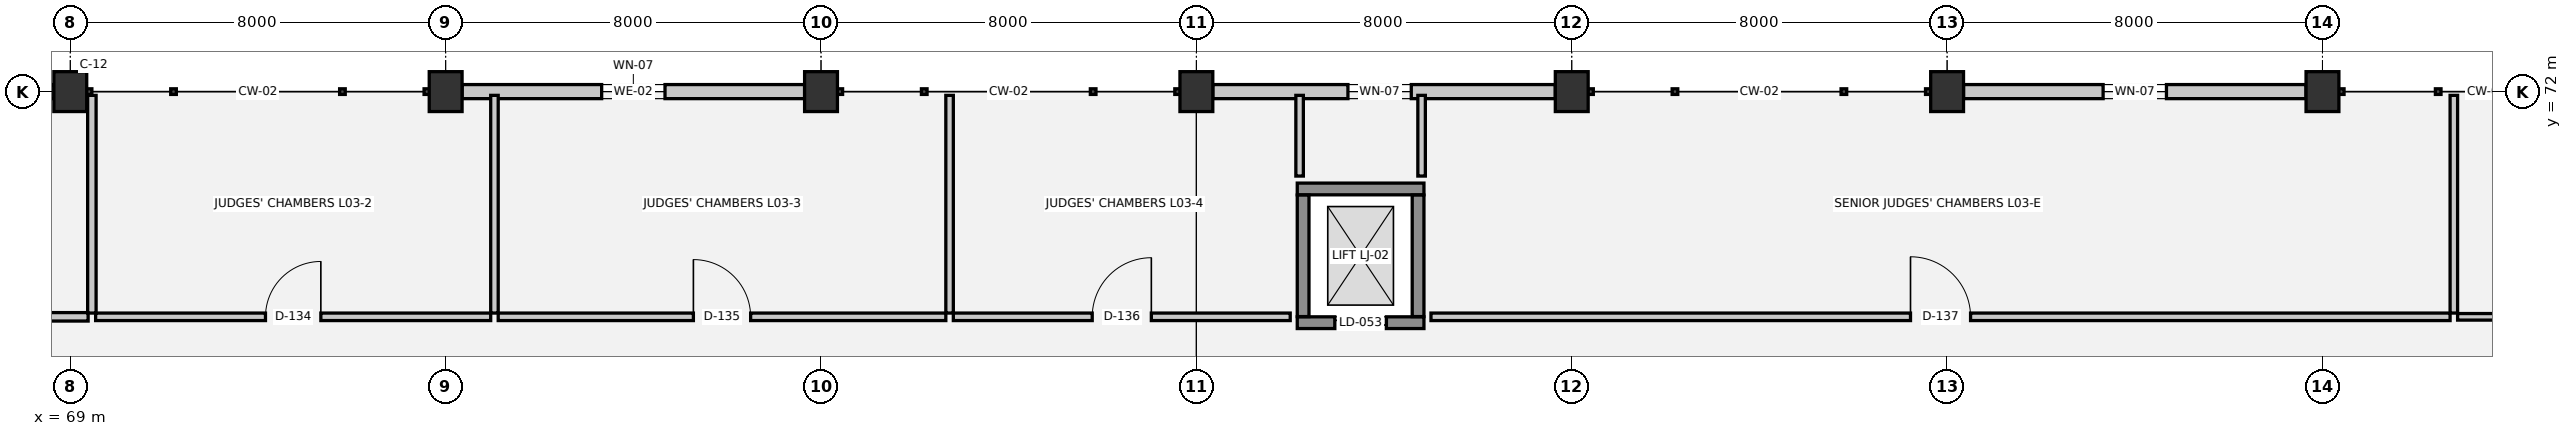
"""IFC4 building model, lengths in metres.
Left out: names, types, materials, properties, quantities, classifications, styles, units other than length and angle.
Written with IfcOpenShell. Run it as: python <this file> out.ifc"""

import sys

from ifc_helpers import new_model, si_unit, direction, frame, frame_2d, origin, origin_2d, place, context, subcontext, project, spatial, rectangle, extrude, element, fill, save


model = new_model("IFC4")
c1 = context("Model", 3, precision=1e-05, world=origin(), true_north=direction((0.0, 1.0)))
c2 = subcontext(c1, "Body", "Model", "MODEL_VIEW")
j1 = project(units=[si_unit("LENGTHUNIT", "METRE"), si_unit("PLANEANGLEUNIT", "RADIAN")], contexts=[c1])
p1 = place(None, origin())
s1 = spatial("IfcSite", under=j1, at=p1, CompositionType="ELEMENT")
p2 = place(p1, origin())
s2 = spatial("IfcBuilding", under=s1, at=p2, CompositionType="ELEMENT")
p3 = place(p2, frame((0.0, 0.0, 9.9)))
s3 = spatial("IfcBuildingStorey", under=s2, at=p3, CompositionType="ELEMENT", Elevation=9.9)
for number, where, z_axis, x_axis in (
    (1, (69.0, 72.0, 0.0), (0.0, 0.0, 1.0), (1.0, 0.0, 0.0)),
    (2, (77.0, 72.0, 0.0), (0.0, 0.0, 1.0), (1.0, 0.0, 0.0)),
    (3, (85.0, 72.0, 0.0), (0.0, 0.0, 1.0), (1.0, 0.0, 0.0)),
    (4, (93.0, 72.0, 0.0), (0.0, 0.0, 1.0), (1.0, 0.0, 0.0)),
    (5, (101.0, 72.0, 0.0), (0.0, 0.0, 1.0), (1.0, 0.0, 0.0)),
    (6, (109.0, 72.0, 0.0), (0.0, 0.0, 1.0), (1.0, 0.0, 0.0)),
    (7, (117.0, 72.0, 0.0), (0.0, 0.0, 1.0), (1.0, 0.0, 0.0)),
):
    element("IfcColumn", number, at=place(p3, frame(where, z_axis=z_axis, x_axis=x_axis)), inside=s3, PredefinedType="COLUMN", context=c2, shape_type="SweptSolid", body=[
        extrude(rectangle(XDim=0.7, YDim=0.85, at=origin_2d()), origin(), (0.0, 0.0, 1.0), 4.5),
    ])
p4 = place(p3, frame((62.35, 72.0, 0.0), z_axis=(0.0, 0.0, 1.0), x_axis=(1.0, 0.0, 0.0)))
e8 = element("IfcWall", 8, at=p4, inside=s3, PredefinedType="SOLIDWALL", context=c2, shape_type="SweptSolid", body=[
    extrude(rectangle(XDim=6.3, YDim=0.3, at=frame_2d((3.15, 0.0))), origin(), (0.0, 0.0, 1.0), 3.23),
])
p5 = place(p4, frame((2.475, 0.0, 1.0)))
e9 = element("IfcOpeningElement", 9, at=p5, cuts=e8, PredefinedType="OPENING", context=c2, shape_type="SweptSolid", body=[
    extrude(rectangle(XDim=1.35, YDim=1.65, at=frame_2d((0.675, 0.825))), frame((0.0, 0.16, 0.0), z_axis=(0.0, -1.0, 0.0), x_axis=(1.0, 0.0, 0.0)), (0.0, 0.0, 1.0), 0.32),
])
p6 = place(p3, frame((77.35, 72.0, 0.0), z_axis=(0.0, 0.0, 1.0), x_axis=(1.0, 0.0, 0.0)))
e10 = element("IfcWall", 10, at=p6, inside=s3, PredefinedType="SOLIDWALL", context=c2, shape_type="SweptSolid", body=[
    extrude(rectangle(XDim=7.3, YDim=0.3, at=frame_2d((3.65, 0.0))), origin(), (0.0, 0.0, 1.0), 3.23),
])
p7 = place(p6, frame((2.975, 0.0, 1.0)))
e11 = element("IfcOpeningElement", 11, at=p7, cuts=e10, PredefinedType="OPENING", context=c2, shape_type="SweptSolid", body=[
    extrude(rectangle(XDim=1.35, YDim=1.65, at=frame_2d((0.675, 0.825))), frame((0.0, 0.16, 0.0), z_axis=(0.0, -1.0, 0.0), x_axis=(1.0, 0.0, 0.0)), (0.0, 0.0, 1.0), 0.32),
])
p8 = place(p3, frame((93.35, 72.0, 0.0), z_axis=(0.0, 0.0, 1.0), x_axis=(1.0, 0.0, 0.0)))
e12 = element("IfcWall", 12, at=p8, inside=s3, PredefinedType="SOLIDWALL", context=c2, shape_type="SweptSolid", body=[
    extrude(rectangle(XDim=7.3, YDim=0.3, at=frame_2d((3.65, 0.0))), origin(), (0.0, 0.0, 1.0), 3.23),
])
p9 = place(p8, frame((2.88, 0.0, 1.0)))
e13 = element("IfcOpeningElement", 13, at=p9, cuts=e12, PredefinedType="OPENING", context=c2, shape_type="SweptSolid", body=[
    extrude(rectangle(XDim=1.35, YDim=1.65, at=frame_2d((0.675, 0.825))), frame((0.0, 0.16, 0.0), z_axis=(0.0, -1.0, 0.0), x_axis=(1.0, 0.0, 0.0)), (0.0, 0.0, 1.0), 0.32),
])
p10 = place(p3, frame((109.35, 72.0, 0.0), z_axis=(0.0, 0.0, 1.0), x_axis=(1.0, 0.0, 0.0)))
e14 = element("IfcWall", 14, at=p10, inside=s3, PredefinedType="SOLIDWALL", context=c2, shape_type="SweptSolid", body=[
    extrude(rectangle(XDim=7.3, YDim=0.3, at=frame_2d((3.65, 0.0))), origin(), (0.0, 0.0, 1.0), 3.23),
])
p11 = place(p10, frame((2.975, 0.0, 1.0)))
e15 = element("IfcOpeningElement", 15, at=p11, cuts=e14, PredefinedType="OPENING", context=c2, shape_type="SweptSolid", body=[
    extrude(rectangle(XDim=1.35, YDim=1.65, at=frame_2d((0.675, 0.825))), frame((0.0, 0.16, 0.0), z_axis=(0.0, -1.0, 0.0), x_axis=(1.0, 0.0, 0.0)), (0.0, 0.0, 1.0), 0.32),
])
p12 = place(p3, frame((95.15, 67.075, 0.0), z_axis=(0.0, 0.0, 1.0), x_axis=(1.0, 0.0, 0.0)))
e16 = element("IfcWall", 16, at=p12, inside=s3, PredefinedType="SHEAR", context=c2, shape_type="SweptSolid", body=[
    extrude(rectangle(XDim=2.7, YDim=0.25, at=frame_2d((1.35, 0.0))), origin(), (0.0, 0.0, 1.0), 4.5),
])
p13 = place(p12, frame((0.8, 0.0, 0.0)))
e17 = element("IfcOpeningElement", 17, at=p13, cuts=e16, PredefinedType="OPENING", context=c2, shape_type="SweptSolid", body=[
    extrude(rectangle(XDim=1.1, YDim=2.15, at=frame_2d((0.55, 1.075))), frame((0.0, 0.135, 0.0), z_axis=(0.0, -1.0, 0.0), x_axis=(1.0, 0.0, 0.0)), (0.0, 0.0, 1.0), 0.27),
])
p14 = place(p3, frame((97.85, 69.925, 0.0), z_axis=(0.0, 0.0, 1.0), x_axis=(-1.0, 0.0, 0.0)))
e18 = element("IfcWall", 18, at=p14, inside=s3, PredefinedType="SHEAR", context=c2, shape_type="SweptSolid", body=[
    extrude(rectangle(XDim=2.7, YDim=0.25, at=frame_2d((1.35, 0.0))), origin(), (0.0, 0.0, 1.0), 4.5),
])
for number, where, z_axis, x_axis in (
    (19, (95.275, 69.795, 0.0), (0.0, 0.0, 1.0), (0.0, -1.0, 0.0)),
    (20, (97.725, 67.205, 0.0), (0.0, 0.0, 1.0), (0.0, 1.0, 0.0)),
):
    element("IfcWall", number, at=place(p3, frame(where, z_axis=z_axis, x_axis=x_axis)), inside=s3, PredefinedType="SHEAR", context=c2, shape_type="SweptSolid", body=[
        extrude(rectangle(XDim=2.59, YDim=0.25, at=frame_2d((1.295, 0.0))), origin(), (0.0, 0.0, 1.0), 4.5),
    ])
p15 = place(p3, frame((62.08, 67.2, 0.0), z_axis=(0.0, 0.0, 1.0), x_axis=(1.0, 0.0, 0.0)))
e21 = element("IfcWall", 21, at=p15, inside=s3, PredefinedType="PARTITIONING", context=c2, shape_type="SweptSolid", body=[
    extrude(rectangle(XDim=7.3, YDim=0.18, at=frame_2d((3.65, 0.0))), origin(), (0.0, 0.0, 1.0), 4.14),
])
p16 = place(p15, frame((3.075, 0.0, 0.0)))
e22 = element("IfcOpeningElement", 22, at=p16, cuts=e21, PredefinedType="OPENING", context=c2, shape_type="SweptSolid", body=[
    extrude(rectangle(XDim=1.15, YDim=2.2, at=frame_2d((0.575, 1.1))), frame((0.0, 0.1, 0.0), z_axis=(0.0, -1.0, 0.0), x_axis=(1.0, 0.0, 0.0)), (0.0, 0.0, 1.0), 0.2),
])
p17 = place(p3, frame((69.54, 67.2, 0.0), z_axis=(0.0, 0.0, 1.0), x_axis=(1.0, 0.0, 0.0)))
e23 = element("IfcWall", 23, at=p17, inside=s3, PredefinedType="PARTITIONING", context=c2, shape_type="SweptSolid", body=[
    extrude(rectangle(XDim=8.42, YDim=0.16, at=frame_2d((4.21, 0.0))), origin(), (0.0, 0.0, 1.0), 4.14),
])
p18 = place(p17, frame((3.62, 0.0, 0.0)))
e24 = element("IfcOpeningElement", 24, at=p18, cuts=e23, PredefinedType="OPENING", context=c2, shape_type="SweptSolid", body=[
    extrude(rectangle(XDim=1.18, YDim=2.2, at=frame_2d((0.59, 1.1))), frame((0.0, 0.09, 0.0), z_axis=(0.0, -1.0, 0.0), x_axis=(1.0, 0.0, 0.0)), (0.0, 0.0, 1.0), 0.18),
])
p19 = place(p3, frame((78.12, 67.2, 0.0), z_axis=(0.0, 0.0, 1.0), x_axis=(1.0, 0.0, 0.0)))
e25 = element("IfcWall", 25, at=p19, inside=s3, PredefinedType="PARTITIONING", context=c2, shape_type="SweptSolid", body=[
    extrude(rectangle(XDim=9.54, YDim=0.16, at=frame_2d((4.77, 0.0))), origin(), (0.0, 0.0, 1.0), 4.14),
])
p20 = place(p19, frame((4.16, 0.0, 0.0)))
e26 = element("IfcOpeningElement", 26, at=p20, cuts=e25, PredefinedType="OPENING", context=c2, shape_type="SweptSolid", body=[
    extrude(rectangle(XDim=1.22, YDim=2.2, at=frame_2d((0.61, 1.1))), frame((0.0, 0.09, 0.0), z_axis=(0.0, -1.0, 0.0), x_axis=(1.0, 0.0, 0.0)), (0.0, 0.0, 1.0), 0.18),
])
p21 = place(p3, frame((87.82, 67.2, 0.0), z_axis=(0.0, 0.0, 1.0), x_axis=(1.0, 0.0, 0.0)))
e27 = element("IfcWall", 27, at=p21, inside=s3, PredefinedType="PARTITIONING", context=c2, shape_type="SweptSolid", body=[
    extrude(rectangle(XDim=7.18, YDim=0.16, at=frame_2d((3.59, 0.0))), origin(), (0.0, 0.0, 1.0), 4.14),
])
p22 = place(p21, frame((2.96, 0.0, 0.0)))
e28 = element("IfcOpeningElement", 28, at=p22, cuts=e27, PredefinedType="OPENING", context=c2, shape_type="SweptSolid", body=[
    extrude(rectangle(XDim=1.26, YDim=2.2, at=frame_2d((0.63, 1.1))), frame((0.0, 0.09, 0.0), z_axis=(0.0, -1.0, 0.0), x_axis=(1.0, 0.0, 0.0)), (0.0, 0.0, 1.0), 0.18),
])
p23 = place(p3, frame((98.0, 67.2, 0.0), z_axis=(0.0, 0.0, 1.0), x_axis=(1.0, 0.0, 0.0)))
e29 = element("IfcWall", 29, at=p23, inside=s3, PredefinedType="PARTITIONING", context=c2, shape_type="SweptSolid", body=[
    extrude(rectangle(XDim=21.72, YDim=0.16, at=frame_2d((10.86, 0.0))), origin(), (0.0, 0.0, 1.0), 4.14),
])
p24 = place(p23, frame((10.22, 0.0, 0.0)))
e30 = element("IfcOpeningElement", 30, at=p24, cuts=e29, PredefinedType="OPENING", context=c2, shape_type="SweptSolid", body=[
    extrude(rectangle(XDim=1.28, YDim=2.2, at=frame_2d((0.64, 1.1))), frame((0.0, 0.09, 0.0), z_axis=(0.0, -1.0, 0.0), x_axis=(1.0, 0.0, 0.0)), (0.0, 0.0, 1.0), 0.18),
])
p25 = place(p3, frame((119.88, 67.2, 0.0), z_axis=(0.0, 0.0, 1.0), x_axis=(1.0, 0.0, 0.0)))
e31 = element("IfcWall", 31, at=p25, inside=s3, PredefinedType="PLUMBINGWALL", context=c2, shape_type="SweptSolid", body=[
    extrude(rectangle(XDim=4.04, YDim=0.14, at=frame_2d((2.02, 0.0))), origin(), (0.0, 0.0, 1.0), 4.14),
])
p26 = place(p25, frame((1.56, 0.0, 0.0)))
e32 = element("IfcOpeningElement", 32, at=p26, cuts=e31, PredefinedType="OPENING", context=c2, shape_type="SweptSolid", body=[
    extrude(rectangle(XDim=0.92, YDim=2.1, at=frame_2d((0.46, 1.05))), frame((0.0, 0.08, 0.0), z_axis=(0.0, -1.0, 0.0), x_axis=(1.0, 0.0, 0.0)), (0.0, 0.0, 1.0), 0.16),
])
p27 = place(p3, frame((69.46, 67.28, 0.0), z_axis=(0.0, 0.0, 1.0), x_axis=(0.0, 1.0, 0.0)))
e33 = element("IfcWall", 33, at=p27, inside=s3, PredefinedType="PARTITIONING", context=c2, shape_type="SweptSolid", body=[
    extrude(rectangle(XDim=4.64, YDim=0.18, at=frame_2d((2.32, 0.0))), origin(), (0.0, 0.0, 1.0), 4.14),
])
for number, where, z_axis, x_axis in (
    (34, (78.04, 67.28, 0.0), (0.0, 0.0, 1.0), (0.0, 1.0, 0.0)),
    (35, (87.74, 67.28, 0.0), (0.0, 0.0, 1.0), (0.0, 1.0, 0.0)),
):
    element("IfcWall", number, at=place(p3, frame(where, z_axis=z_axis, x_axis=x_axis)), inside=s3, PredefinedType="PARTITIONING", context=c2, shape_type="SweptSolid", body=[
        extrude(rectangle(XDim=4.64, YDim=0.16, at=frame_2d((2.32, 0.0))), origin(), (0.0, 0.0, 1.0), 4.14),
    ])
for number, where, z_axis, x_axis in (
    (36, (95.2, 70.2, 0.0), (0.0, 0.0, 1.0), (0.0, 1.0, 0.0)),
    (37, (97.8, 70.2, 0.0), (0.0, 0.0, 1.0), (0.0, 1.0, 0.0)),
):
    element("IfcWall", number, at=place(p3, frame(where, z_axis=z_axis, x_axis=x_axis)), inside=s3, PredefinedType="PARTITIONING", context=c2, shape_type="SweptSolid", body=[
        extrude(rectangle(XDim=1.72, YDim=0.16, at=frame_2d((0.86, 0.0))), origin(), (0.0, 0.0, 1.0), 4.14),
    ])
p28 = place(p3, frame((119.8, 67.28, 0.0), z_axis=(0.0, 0.0, 1.0), x_axis=(0.0, 1.0, 0.0)))
e38 = element("IfcWall", 38, at=p28, inside=s3, PredefinedType="PARTITIONING", context=c2, shape_type="SweptSolid", body=[
    extrude(rectangle(XDim=4.64, YDim=0.16, at=frame_2d((2.32, 0.0))), origin(), (0.0, 0.0, 1.0), 4.14),
])
p29 = place(p7, origin())
e39 = element("IfcWindow", 39, at=p29, inside=s3, PartitioningType="SINGLE_PANEL", PredefinedType="WINDOW", context=c2, shape_type="SweptSolid", body=[
    extrude(rectangle(XDim=1.35, YDim=1.65, at=frame_2d((0.675, 0.825))), frame((0.0, 0.03, 0.0), z_axis=(0.0, -1.0, 0.0), x_axis=(1.0, 0.0, 0.0)), (0.0, 0.0, 1.0), 0.06),
])
fill(e11, e39)
p30 = place(p9, origin())
e40 = element("IfcWindow", 40, at=p30, inside=s3, PartitioningType="SINGLE_PANEL", PredefinedType="WINDOW", context=c2, shape_type="SweptSolid", body=[
    extrude(rectangle(XDim=1.35, YDim=1.65, at=frame_2d((0.675, 0.825))), frame((0.0, 0.03, 0.0), z_axis=(0.0, -1.0, 0.0), x_axis=(1.0, 0.0, 0.0)), (0.0, 0.0, 1.0), 0.06),
])
fill(e13, e40)
p31 = place(p11, origin())
e41 = element("IfcWindow", 41, at=p31, inside=s3, PartitioningType="SINGLE_PANEL", PredefinedType="WINDOW", context=c2, shape_type="SweptSolid", body=[
    extrude(rectangle(XDim=1.35, YDim=1.65, at=frame_2d((0.675, 0.825))), frame((0.0, 0.03, 0.0), z_axis=(0.0, -1.0, 0.0), x_axis=(1.0, 0.0, 0.0)), (0.0, 0.0, 1.0), 0.06),
])
fill(e15, e41)
p32 = place(p13, origin())
e42 = element("IfcDoor", 42, at=p32, inside=s3, OperationType="DOUBLE_DOOR_SLIDING", PredefinedType="DOOR", context=c2, shape_type="SweptSolid", body=[
    extrude(rectangle(XDim=1.1, YDim=2.15, at=frame_2d((0.55, 1.075))), frame((0.0, 0.025, 0.0), z_axis=(0.0, -1.0, 0.0), x_axis=(1.0, 0.0, 0.0)), (0.0, 0.0, 1.0), 0.05),
])
fill(e17, e42)
p33 = place(p18, origin())
e43 = element("IfcDoor", 43, at=p33, inside=s3, OperationType="SINGLE_SWING_RIGHT", PredefinedType="DOOR", context=c2, shape_type="SweptSolid", body=[
    extrude(rectangle(XDim=1.18, YDim=2.2, at=frame_2d((0.59, 1.1))), frame((0.0, 0.025, 0.0), z_axis=(0.0, -1.0, 0.0), x_axis=(1.0, 0.0, 0.0)), (0.0, 0.0, 1.0), 0.05),
])
fill(e24, e43)
p34 = place(p20, origin())
e44 = element("IfcDoor", 44, at=p34, inside=s3, OperationType="SINGLE_SWING_LEFT", PredefinedType="DOOR", context=c2, shape_type="SweptSolid", body=[
    extrude(rectangle(XDim=1.22, YDim=2.2, at=frame_2d((0.61, 1.1))), frame((0.0, 0.025, 0.0), z_axis=(0.0, -1.0, 0.0), x_axis=(1.0, 0.0, 0.0)), (0.0, 0.0, 1.0), 0.05),
])
fill(e26, e44)
p35 = place(p22, origin())
e45 = element("IfcDoor", 45, at=p35, inside=s3, OperationType="SINGLE_SWING_RIGHT", PredefinedType="DOOR", context=c2, shape_type="SweptSolid", body=[
    extrude(rectangle(XDim=1.26, YDim=2.2, at=frame_2d((0.63, 1.1))), frame((0.0, 0.025, 0.0), z_axis=(0.0, -1.0, 0.0), x_axis=(1.0, 0.0, 0.0)), (0.0, 0.0, 1.0), 0.05),
])
fill(e28, e45)
p36 = place(p24, origin())
e46 = element("IfcDoor", 46, at=p36, inside=s3, OperationType="SINGLE_SWING_LEFT", PredefinedType="DOOR", context=c2, shape_type="SweptSolid", body=[
    extrude(rectangle(XDim=1.28, YDim=2.2, at=frame_2d((0.64, 1.1))), frame((0.0, 0.025, 0.0), z_axis=(0.0, -1.0, 0.0), x_axis=(1.0, 0.0, 0.0)), (0.0, 0.0, 1.0), 0.05),
])
fill(e30, e46)
save(model, sys.argv[1])
